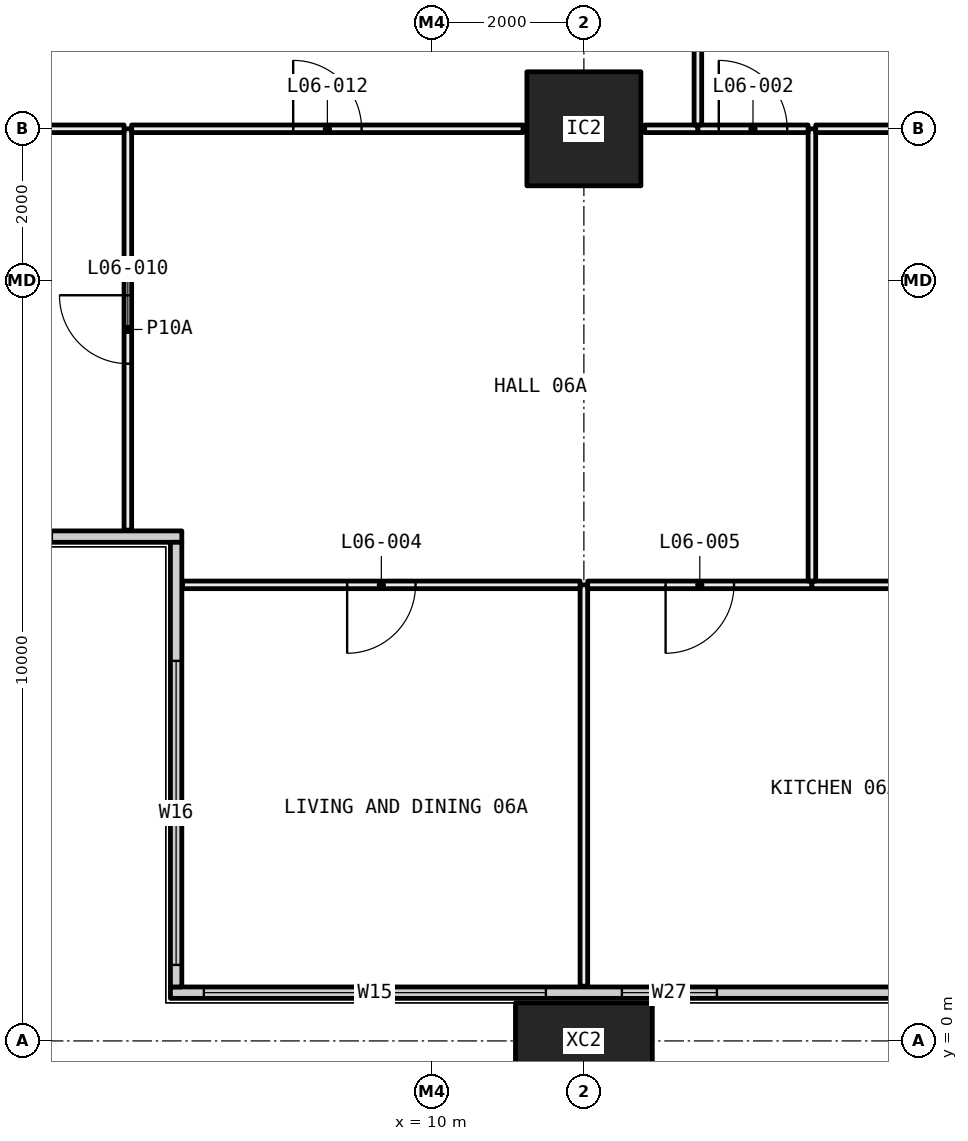
"""IFC4 building model, lengths in metres.
Left out: names, types, materials, properties, quantities, classifications, styles, units other than length and angle.
Written with IfcOpenShell. Run it as: python <this file> out.ifc"""

import sys

from ifc_helpers import new_model, si_unit, direction, frame, frame_2d, origin, origin_2d, place, context, subcontext, project, spatial, rectangle, hollow_rectangle, extrude, element, fill, save


model = new_model("IFC4")
c1 = context("Model", 3, precision=1e-05, world=origin(), true_north=direction((0.0, 1.0)))
c2 = subcontext(c1, "Body", "Model", "MODEL_VIEW")
j1 = project(units=[si_unit("LENGTHUNIT", "METRE"), si_unit("PLANEANGLEUNIT", "RADIAN")], contexts=[c1])
p1 = place(None, origin())
s1 = spatial("IfcSite", under=j1, at=p1, CompositionType="ELEMENT")
p2 = place(p1, origin())
s2 = spatial("IfcBuilding", under=s1, at=p2, CompositionType="ELEMENT")
p3 = place(p2, frame((0.0, 0.0, 33.45)))
s3 = spatial("IfcBuildingStorey", under=s2, at=p3, CompositionType="ELEMENT", Elevation=33.45)
p4 = place(p3, frame((12.0, 0.0, -0.4), z_axis=(0.0, 0.0, 1.0), x_axis=(1.0, 0.0, 0.0)))
e1 = element("IfcColumn", 1, at=p4, inside=s3, PredefinedType="COLUMN", context=c2, shape_type="SweptSolid", body=[
    extrude(hollow_rectangle(XDim=1.8, YDim=1.0, WallThickness=0.07, at=origin_2d()), origin(), (0.0, 0.0, 1.0), 3.45),
])
p5 = place(p3, frame((12.0, 12.0, 0.0), z_axis=(0.0, 0.0, 1.0), x_axis=(1.0, 0.0, 0.0)))
e2 = element("IfcColumn", 2, at=p5, inside=s3, PredefinedType="COLUMN", context=c2, shape_type="SweptSolid", body=[
    extrude(hollow_rectangle(XDim=1.5, YDim=1.5, WallThickness=0.065, at=origin_2d()), origin(), (0.0, 0.0, 1.0), 3.05),
])
p6 = place(p3, frame((6.56, 0.635, 0.0), z_axis=(0.0, 0.0, 1.0), x_axis=(1.0, 0.0, 0.0)))
e3 = element("IfcWall", 3, at=p6, inside=s3, PredefinedType="ELEMENTEDWALL", context=c2, shape_type="SweptSolid", body=[
    extrude(rectangle(XDim=58.88, YDim=0.15, at=frame_2d((29.44, 0.0))), origin(), (0.0, 0.0, 1.0), 3.05),
])
p7 = place(p6, frame((0.44, 0.0, 0.45)))
e4 = element("IfcOpeningElement", 4, at=p7, cuts=e3, PredefinedType="OPENING", context=c2, shape_type="SweptSolid", body=[
    extrude(rectangle(XDim=4.5, YDim=2.55, at=frame_2d((2.25, 1.275))), frame((0.0, 0.085, 0.0), z_axis=(0.0, -1.0, 0.0), x_axis=(1.0, 0.0, 0.0)), (0.0, 0.0, 1.0), 0.17),
])
p8 = place(p6, frame((5.94, 0.0, 0.45)))
e5 = element("IfcOpeningElement", 5, at=p8, cuts=e3, PredefinedType="OPENING", context=c2, shape_type="SweptSolid", body=[
    extrude(rectangle(XDim=1.25, YDim=2.55, at=frame_2d((0.625, 1.275))), frame((0.0, 0.085, 0.0), z_axis=(0.0, -1.0, 0.0), x_axis=(1.0, 0.0, 0.0)), (0.0, 0.0, 1.0), 0.17),
])
p9 = place(p6, frame((9.94, 0.0, 0.45)))
e6 = element("IfcOpeningElement", 6, at=p9, cuts=e3, PredefinedType="OPENING", context=c2, shape_type="SweptSolid", body=[
    extrude(rectangle(XDim=1.0, YDim=2.55, at=frame_2d((0.5, 1.275))), frame((0.0, 0.085, 0.0), z_axis=(0.0, -1.0, 0.0), x_axis=(1.0, 0.0, 0.0)), (0.0, 0.0, 1.0), 0.17),
])
p10 = place(p6, frame((11.94, 0.0, 0.45)))
e7 = element("IfcOpeningElement", 7, at=p10, cuts=e3, PredefinedType="OPENING", context=c2, shape_type="SweptSolid", body=[
    extrude(rectangle(XDim=1.0, YDim=2.55, at=frame_2d((0.5, 1.275))), frame((0.0, 0.085, 0.0), z_axis=(0.0, -1.0, 0.0), x_axis=(1.0, 0.0, 0.0)), (0.0, 0.0, 1.0), 0.17),
])
p11 = place(p6, frame((15.69, 0.0, 0.45)))
e8 = element("IfcOpeningElement", 8, at=p11, cuts=e3, PredefinedType="OPENING", context=c2, shape_type="SweptSolid", body=[
    extrude(rectangle(XDim=1.25, YDim=2.55, at=frame_2d((0.625, 1.275))), frame((0.0, 0.085, 0.0), z_axis=(0.0, -1.0, 0.0), x_axis=(1.0, 0.0, 0.0)), (0.0, 0.0, 1.0), 0.17),
])
p12 = place(p6, frame((17.94, 0.0, 0.45)))
e9 = element("IfcOpeningElement", 9, at=p12, cuts=e3, PredefinedType="OPENING", context=c2, shape_type="SweptSolid", body=[
    extrude(rectangle(XDim=1.25, YDim=2.55, at=frame_2d((0.625, 1.275))), frame((0.0, 0.085, 0.0), z_axis=(0.0, -1.0, 0.0), x_axis=(1.0, 0.0, 0.0)), (0.0, 0.0, 1.0), 0.17),
])
p13 = place(p6, frame((21.94, 0.0, 0.45)))
e10 = element("IfcOpeningElement", 10, at=p13, cuts=e3, PredefinedType="OPENING", context=c2, shape_type="SweptSolid", body=[
    extrude(rectangle(XDim=1.0, YDim=2.55, at=frame_2d((0.5, 1.275))), frame((0.0, 0.085, 0.0), z_axis=(0.0, -1.0, 0.0), x_axis=(1.0, 0.0, 0.0)), (0.0, 0.0, 1.0), 0.17),
])
p14 = place(p6, frame((23.94, 0.0, 0.45)))
e11 = element("IfcOpeningElement", 11, at=p14, cuts=e3, PredefinedType="OPENING", context=c2, shape_type="SweptSolid", body=[
    extrude(rectangle(XDim=1.0, YDim=2.55, at=frame_2d((0.5, 1.275))), frame((0.0, 0.085, 0.0), z_axis=(0.0, -1.0, 0.0), x_axis=(1.0, 0.0, 0.0)), (0.0, 0.0, 1.0), 0.17),
])
p15 = place(p6, frame((27.69, 0.0, 0.45)))
e12 = element("IfcOpeningElement", 12, at=p15, cuts=e3, PredefinedType="OPENING", context=c2, shape_type="SweptSolid", body=[
    extrude(rectangle(XDim=1.25, YDim=2.55, at=frame_2d((0.625, 1.275))), frame((0.0, 0.085, 0.0), z_axis=(0.0, -1.0, 0.0), x_axis=(1.0, 0.0, 0.0)), (0.0, 0.0, 1.0), 0.17),
])
p16 = place(p6, frame((29.94, 0.0, 0.45)))
e13 = element("IfcOpeningElement", 13, at=p16, cuts=e3, PredefinedType="OPENING", context=c2, shape_type="SweptSolid", body=[
    extrude(rectangle(XDim=1.25, YDim=2.55, at=frame_2d((0.625, 1.275))), frame((0.0, 0.085, 0.0), z_axis=(0.0, -1.0, 0.0), x_axis=(1.0, 0.0, 0.0)), (0.0, 0.0, 1.0), 0.17),
])
p17 = place(p6, frame((33.94, 0.0, 0.45)))
e14 = element("IfcOpeningElement", 14, at=p17, cuts=e3, PredefinedType="OPENING", context=c2, shape_type="SweptSolid", body=[
    extrude(rectangle(XDim=1.0, YDim=2.55, at=frame_2d((0.5, 1.275))), frame((0.0, 0.085, 0.0), z_axis=(0.0, -1.0, 0.0), x_axis=(1.0, 0.0, 0.0)), (0.0, 0.0, 1.0), 0.17),
])
p18 = place(p6, frame((35.94, 0.0, 0.45)))
e15 = element("IfcOpeningElement", 15, at=p18, cuts=e3, PredefinedType="OPENING", context=c2, shape_type="SweptSolid", body=[
    extrude(rectangle(XDim=1.0, YDim=2.55, at=frame_2d((0.5, 1.275))), frame((0.0, 0.085, 0.0), z_axis=(0.0, -1.0, 0.0), x_axis=(1.0, 0.0, 0.0)), (0.0, 0.0, 1.0), 0.17),
])
p19 = place(p6, frame((39.69, 0.0, 0.45)))
e16 = element("IfcOpeningElement", 16, at=p19, cuts=e3, PredefinedType="OPENING", context=c2, shape_type="SweptSolid", body=[
    extrude(rectangle(XDim=1.25, YDim=2.55, at=frame_2d((0.625, 1.275))), frame((0.0, 0.085, 0.0), z_axis=(0.0, -1.0, 0.0), x_axis=(1.0, 0.0, 0.0)), (0.0, 0.0, 1.0), 0.17),
])
p20 = place(p6, frame((41.94, 0.0, 0.45)))
e17 = element("IfcOpeningElement", 17, at=p20, cuts=e3, PredefinedType="OPENING", context=c2, shape_type="SweptSolid", body=[
    extrude(rectangle(XDim=1.25, YDim=2.55, at=frame_2d((0.625, 1.275))), frame((0.0, 0.085, 0.0), z_axis=(0.0, -1.0, 0.0), x_axis=(1.0, 0.0, 0.0)), (0.0, 0.0, 1.0), 0.17),
])
p21 = place(p6, frame((45.94, 0.0, 0.45)))
e18 = element("IfcOpeningElement", 18, at=p21, cuts=e3, PredefinedType="OPENING", context=c2, shape_type="SweptSolid", body=[
    extrude(rectangle(XDim=1.0, YDim=2.55, at=frame_2d((0.5, 1.275))), frame((0.0, 0.085, 0.0), z_axis=(0.0, -1.0, 0.0), x_axis=(1.0, 0.0, 0.0)), (0.0, 0.0, 1.0), 0.17),
])
p22 = place(p6, frame((47.94, 0.0, 0.45)))
e19 = element("IfcOpeningElement", 19, at=p22, cuts=e3, PredefinedType="OPENING", context=c2, shape_type="SweptSolid", body=[
    extrude(rectangle(XDim=1.0, YDim=2.55, at=frame_2d((0.5, 1.275))), frame((0.0, 0.085, 0.0), z_axis=(0.0, -1.0, 0.0), x_axis=(1.0, 0.0, 0.0)), (0.0, 0.0, 1.0), 0.17),
])
p23 = place(p6, frame((51.69, 0.0, 0.45)))
e20 = element("IfcOpeningElement", 20, at=p23, cuts=e3, PredefinedType="OPENING", context=c2, shape_type="SweptSolid", body=[
    extrude(rectangle(XDim=1.25, YDim=2.55, at=frame_2d((0.625, 1.275))), frame((0.0, 0.085, 0.0), z_axis=(0.0, -1.0, 0.0), x_axis=(1.0, 0.0, 0.0)), (0.0, 0.0, 1.0), 0.17),
])
p24 = place(p6, frame((53.94, 0.0, 0.45)))
e21 = element("IfcOpeningElement", 21, at=p24, cuts=e3, PredefinedType="OPENING", context=c2, shape_type="SweptSolid", body=[
    extrude(rectangle(XDim=4.5, YDim=2.55, at=frame_2d((2.25, 1.275))), frame((0.0, 0.085, 0.0), z_axis=(0.0, -1.0, 0.0), x_axis=(1.0, 0.0, 0.0)), (0.0, 0.0, 1.0), 0.17),
])
p25 = place(p3, frame((0.56, 6.635, 0.0), z_axis=(0.0, 0.0, 1.0), x_axis=(1.0, 0.0, 0.0)))
e22 = element("IfcWall", 22, at=p25, inside=s3, PredefinedType="ELEMENTEDWALL", context=c2, shape_type="SweptSolid", body=[
    extrude(rectangle(XDim=6.15, YDim=0.15, at=frame_2d((3.075, 0.0))), origin(), (0.0, 0.0, 1.0), 3.05),
])
p26 = place(p25, frame((0.44, 0.0, 0.45)))
e23 = element("IfcOpeningElement", 23, at=p26, cuts=e22, PredefinedType="OPENING", context=c2, shape_type="SweptSolid", body=[
    extrude(rectangle(XDim=4.0, YDim=2.55, at=frame_2d((2.0, 1.275))), frame((0.0, 0.085, 0.0), z_axis=(0.0, -1.0, 0.0), x_axis=(1.0, 0.0, 0.0)), (0.0, 0.0, 1.0), 0.17),
])
p27 = place(p3, frame((6.635, 0.71, 0.0), z_axis=(0.0, 0.0, 1.0), x_axis=(0.0, 1.0, 0.0)))
e24 = element("IfcWall", 24, at=p27, inside=s3, PredefinedType="ELEMENTEDWALL", context=c2, shape_type="SweptSolid", body=[
    extrude(rectangle(XDim=5.85, YDim=0.15, at=frame_2d((2.925, 0.0))), origin(), (0.0, 0.0, 1.0), 3.05),
])
p28 = place(p27, frame((0.29, 0.0, 0.45)))
e25 = element("IfcOpeningElement", 25, at=p28, cuts=e24, PredefinedType="OPENING", context=c2, shape_type="SweptSolid", body=[
    extrude(rectangle(XDim=4.0, YDim=2.55, at=frame_2d((2.0, 1.275))), frame((0.0, 0.085, 0.0), z_axis=(0.0, -1.0, 0.0), x_axis=(1.0, 0.0, 0.0)), (0.0, 0.0, 1.0), 0.17),
])
p29 = place(p3, frame((12.0, 0.72, 0.0), z_axis=(0.0, 0.0, 1.0), x_axis=(0.0, 1.0, 0.0)))
e26 = element("IfcWall", 26, at=p29, inside=s3, PredefinedType="PARTITIONING", context=c2, shape_type="SweptSolid", body=[
    extrude(rectangle(XDim=5.28, YDim=0.1, at=frame_2d((2.64, 0.0))), origin(), (0.0, 0.0, 1.0), 2.45),
])
p30 = place(p3, frame((11.95, 6.0, 0.0), z_axis=(0.0, 0.0, 1.0), x_axis=(-1.0, 0.0, 0.0)))
e27 = element("IfcWall", 27, at=p30, inside=s3, PredefinedType="PARTITIONING", context=c2, shape_type="SweptSolid", body=[
    extrude(rectangle(XDim=5.23, YDim=0.1, at=frame_2d((2.615, 0.0))), origin(), (0.0, 0.0, 1.0), 2.45),
])
p31 = place(p30, frame((2.165, 0.0, 0.0)))
e28 = element("IfcOpeningElement", 28, at=p31, cuts=e27, PredefinedType="OPENING", context=c2, shape_type="SweptSolid", body=[
    extrude(rectangle(XDim=0.9, YDim=2.1, at=frame_2d((0.45, 1.05))), frame((0.0, 0.06, 0.0), z_axis=(0.0, -1.0, 0.0), x_axis=(1.0, 0.0, 0.0)), (0.0, 0.0, 1.0), 0.12),
])
p32 = place(p3, frame((15.0, 6.0, 0.0), z_axis=(0.0, 0.0, 1.0), x_axis=(-1.0, 0.0, 0.0)))
e29 = element("IfcWall", 29, at=p32, inside=s3, PredefinedType="PARTITIONING", context=c2, shape_type="SweptSolid", body=[
    extrude(rectangle(XDim=2.95, YDim=0.1, at=frame_2d((1.475, 0.0))), origin(), (0.0, 0.0, 1.0), 2.45),
])
p33 = place(p32, frame((1.025, 0.0, 0.0)))
e30 = element("IfcOpeningElement", 30, at=p33, cuts=e29, PredefinedType="OPENING", context=c2, shape_type="SweptSolid", body=[
    extrude(rectangle(XDim=0.9, YDim=2.1, at=frame_2d((0.45, 1.05))), frame((0.0, 0.06, 0.0), z_axis=(0.0, -1.0, 0.0), x_axis=(1.0, 0.0, 0.0)), (0.0, 0.0, 1.0), 0.12),
])
p34 = place(p3, frame((17.95, 6.0, 0.0), z_axis=(0.0, 0.0, 1.0), x_axis=(-1.0, 0.0, 0.0)))
e31 = element("IfcWall", 31, at=p34, inside=s3, PredefinedType="PARTITIONING", context=c2, shape_type="SweptSolid", body=[
    extrude(rectangle(XDim=2.95, YDim=0.1, at=frame_2d((1.475, 0.0))), origin(), (0.0, 0.0, 1.0), 3.05),
])
p35 = place(p3, frame((6.0, 6.72, 0.0), z_axis=(0.0, 0.0, 1.0), x_axis=(0.0, 1.0, 0.0)))
e32 = element("IfcWall", 32, at=p35, inside=s3, PredefinedType="PARTITIONING", context=c2, shape_type="SweptSolid", body=[
    extrude(rectangle(XDim=5.28, YDim=0.1, at=frame_2d((2.64, 0.0))), origin(), (0.0, 0.0, 1.0), 2.45),
])
p36 = place(p35, frame((2.19, 0.0, 0.0)))
e33 = element("IfcOpeningElement", 33, at=p36, cuts=e32, PredefinedType="OPENING", context=c2, shape_type="SweptSolid", body=[
    extrude(rectangle(XDim=0.9, YDim=2.1, at=frame_2d((0.45, 1.05))), frame((0.0, 0.06, 0.0), z_axis=(0.0, -1.0, 0.0), x_axis=(1.0, 0.0, 0.0)), (0.0, 0.0, 1.0), 0.12),
])
p37 = place(p3, frame((5.95, 12.0, 0.0), z_axis=(0.0, 0.0, 1.0), x_axis=(-1.0, 0.0, 0.0)))
e34 = element("IfcWall", 34, at=p37, inside=s3, PredefinedType="PARTITIONING", context=c2, shape_type="SweptSolid", body=[
    extrude(rectangle(XDim=5.23, YDim=0.1, at=frame_2d((2.615, 0.0))), origin(), (0.0, 0.0, 1.0), 2.45),
])
p38 = place(p3, frame((15.0, 6.05, 0.0), z_axis=(0.0, 0.0, 1.0), x_axis=(0.0, 1.0, 0.0)))
e35 = element("IfcWall", 35, at=p38, inside=s3, PredefinedType="PARTITIONING", context=c2, shape_type="SweptSolid", body=[
    extrude(rectangle(XDim=5.95, YDim=0.1, at=frame_2d((2.975, 0.0))), origin(), (0.0, 0.0, 1.0), 2.45),
])
p39 = place(p3, frame((11.2, 12.0, 0.0), z_axis=(0.0, 0.0, 1.0), x_axis=(-1.0, 0.0, 0.0)))
e36 = element("IfcWall", 36, at=p39, inside=s3, PredefinedType="PARTITIONING", context=c2, shape_type="SweptSolid", body=[
    extrude(rectangle(XDim=5.15, YDim=0.1, at=frame_2d((2.575, 0.0))), origin(), (0.0, 0.0, 1.0), 2.45),
])
p40 = place(p39, frame((2.125, 0.0, 0.0)))
e37 = element("IfcOpeningElement", 37, at=p40, cuts=e36, PredefinedType="OPENING", context=c2, shape_type="SweptSolid", body=[
    extrude(rectangle(XDim=0.9, YDim=2.1, at=frame_2d((0.45, 1.05))), frame((0.0, 0.06, 0.0), z_axis=(0.0, -1.0, 0.0), x_axis=(1.0, 0.0, 0.0)), (0.0, 0.0, 1.0), 0.12),
])
p41 = place(p3, frame((13.5, 12.0, 0.0), z_axis=(0.0, 0.0, 1.0), x_axis=(-1.0, 0.0, 0.0)))
e38 = element("IfcWall", 38, at=p41, inside=s3, PredefinedType="PARTITIONING", context=c2, shape_type="SweptSolid", body=[
    extrude(rectangle(XDim=0.7, YDim=0.1, at=frame_2d((0.35, 0.0))), origin(), (0.0, 0.0, 1.0), 2.45),
])
p42 = place(p3, frame((14.95, 12.0, 0.0), z_axis=(0.0, 0.0, 1.0), x_axis=(-1.0, 0.0, 0.0)))
e39 = element("IfcWall", 39, at=p42, inside=s3, PredefinedType="PARTITIONING", context=c2, shape_type="SweptSolid", body=[
    extrude(rectangle(XDim=1.45, YDim=0.1, at=frame_2d((0.725, 0.0))), origin(), (0.0, 0.0, 1.0), 2.45),
])
p43 = place(p42, frame((0.275, 0.0, 0.0)))
e40 = element("IfcOpeningElement", 40, at=p43, cuts=e39, PredefinedType="OPENING", context=c2, shape_type="SweptSolid", body=[
    extrude(rectangle(XDim=0.9, YDim=2.1, at=frame_2d((0.45, 1.05))), frame((0.0, 0.06, 0.0), z_axis=(0.0, -1.0, 0.0), x_axis=(1.0, 0.0, 0.0)), (0.0, 0.0, 1.0), 0.12),
])
p44 = place(p3, frame((18.0, 12.0, 0.0), z_axis=(0.0, 0.0, 1.0), x_axis=(-1.0, 0.0, 0.0)))
e41 = element("IfcWall", 41, at=p44, inside=s3, PredefinedType="PARTITIONING", context=c2, shape_type="SweptSolid", body=[
    extrude(rectangle(XDim=2.95, YDim=0.1, at=frame_2d((1.475, 0.0))), origin(), (0.0, 0.0, 1.0), 2.45),
])
p45 = place(p44, frame((1.025, 0.0, 0.0)))
e42 = element("IfcOpeningElement", 42, at=p45, cuts=e41, PredefinedType="OPENING", context=c2, shape_type="SweptSolid", body=[
    extrude(rectangle(XDim=0.9, YDim=2.1, at=frame_2d((0.45, 1.05))), frame((0.0, 0.06, 0.0), z_axis=(0.0, -1.0, 0.0), x_axis=(1.0, 0.0, 0.0)), (0.0, 0.0, 1.0), 0.12),
])
p46 = place(p3, frame((13.5, 12.05, 0.0), z_axis=(0.0, 0.0, 1.0), x_axis=(0.0, 1.0, 0.0)))
e43 = element("IfcWall", 43, at=p46, inside=s3, PredefinedType="PARTITIONING", context=c2, shape_type="SweptSolid", body=[
    extrude(rectangle(XDim=5.85, YDim=0.1, at=frame_2d((2.925, 0.0))), origin(), (0.0, 0.0, 1.0), 2.45),
])
p47 = place(p7, origin())
e44 = element("IfcWindow", 44, at=p47, inside=s3, PartitioningType="SINGLE_PANEL", PredefinedType="WINDOW", context=c2, shape_type="SweptSolid", body=[
    extrude(rectangle(XDim=4.5, YDim=2.55, at=frame_2d((2.25, 1.275))), frame((0.0, 0.03, 0.0), z_axis=(0.0, -1.0, 0.0), x_axis=(1.0, 0.0, 0.0)), (0.0, 0.0, 1.0), 0.06),
])
fill(e4, e44)
p48 = place(p8, origin())
e45 = element("IfcWindow", 45, at=p48, inside=s3, PartitioningType="SINGLE_PANEL", PredefinedType="WINDOW", context=c2, shape_type="SweptSolid", body=[
    extrude(rectangle(XDim=1.25, YDim=2.55, at=frame_2d((0.625, 1.275))), frame((0.0, 0.03, 0.0), z_axis=(0.0, -1.0, 0.0), x_axis=(1.0, 0.0, 0.0)), (0.0, 0.0, 1.0), 0.06),
])
fill(e5, e45)
p49 = place(p28, origin())
e46 = element("IfcWindow", 46, at=p49, inside=s3, PartitioningType="SINGLE_PANEL", PredefinedType="WINDOW", context=c2, shape_type="SweptSolid", body=[
    extrude(rectangle(XDim=4.0, YDim=2.55, at=frame_2d((2.0, 1.275))), frame((0.0, 0.03, 0.0), z_axis=(0.0, -1.0, 0.0), x_axis=(1.0, 0.0, 0.0)), (0.0, 0.0, 1.0), 0.06),
])
fill(e25, e46)
p50 = place(p43, frame((0.9, 0.0, 0.0), x_axis=(-1.0, 0.0, 0.0)))
e47 = element("IfcDoor", 47, at=p50, inside=s3, OperationType="SINGLE_SWING_RIGHT", PredefinedType="DOOR", context=c2, shape_type="SweptSolid", body=[
    extrude(rectangle(XDim=0.9, YDim=2.1, at=frame_2d((0.45, 1.05))), frame((0.0, 0.025, 0.0), z_axis=(0.0, -1.0, 0.0), x_axis=(1.0, 0.0, 0.0)), (0.0, 0.0, 1.0), 0.05),
])
fill(e40, e47)
p51 = place(p31, origin())
e48 = element("IfcDoor", 48, at=p51, inside=s3, OperationType="SINGLE_SWING_LEFT", PredefinedType="DOOR", context=c2, shape_type="SweptSolid", body=[
    extrude(rectangle(XDim=0.9, YDim=2.1, at=frame_2d((0.45, 1.05))), frame((0.0, 0.025, 0.0), z_axis=(0.0, -1.0, 0.0), x_axis=(1.0, 0.0, 0.0)), (0.0, 0.0, 1.0), 0.05),
])
fill(e28, e48)
p52 = place(p33, origin())
e49 = element("IfcDoor", 49, at=p52, inside=s3, OperationType="SINGLE_SWING_LEFT", PredefinedType="DOOR", context=c2, shape_type="SweptSolid", body=[
    extrude(rectangle(XDim=0.9, YDim=2.1, at=frame_2d((0.45, 1.05))), frame((0.0, 0.025, 0.0), z_axis=(0.0, -1.0, 0.0), x_axis=(1.0, 0.0, 0.0)), (0.0, 0.0, 1.0), 0.05),
])
fill(e30, e49)
p53 = place(p36, origin())
e50 = element("IfcDoor", 50, at=p53, inside=s3, OperationType="SINGLE_SWING_LEFT", PredefinedType="DOOR", context=c2, shape_type="SweptSolid", body=[
    extrude(rectangle(XDim=0.9, YDim=2.1, at=frame_2d((0.45, 1.05))), frame((0.0, 0.025, 0.0), z_axis=(0.0, -1.0, 0.0), x_axis=(1.0, 0.0, 0.0)), (0.0, 0.0, 1.0), 0.05),
])
fill(e33, e50)
p54 = place(p40, frame((0.9, 0.0, 0.0), x_axis=(-1.0, 0.0, 0.0)))
e51 = element("IfcDoor", 51, at=p54, inside=s3, OperationType="SINGLE_SWING_RIGHT", PredefinedType="DOOR", context=c2, shape_type="SweptSolid", body=[
    extrude(rectangle(XDim=0.9, YDim=2.1, at=frame_2d((0.45, 1.05))), frame((0.0, 0.025, 0.0), z_axis=(0.0, -1.0, 0.0), x_axis=(1.0, 0.0, 0.0)), (0.0, 0.0, 1.0), 0.05),
])
fill(e37, e51)
save(model, sys.argv[1])
